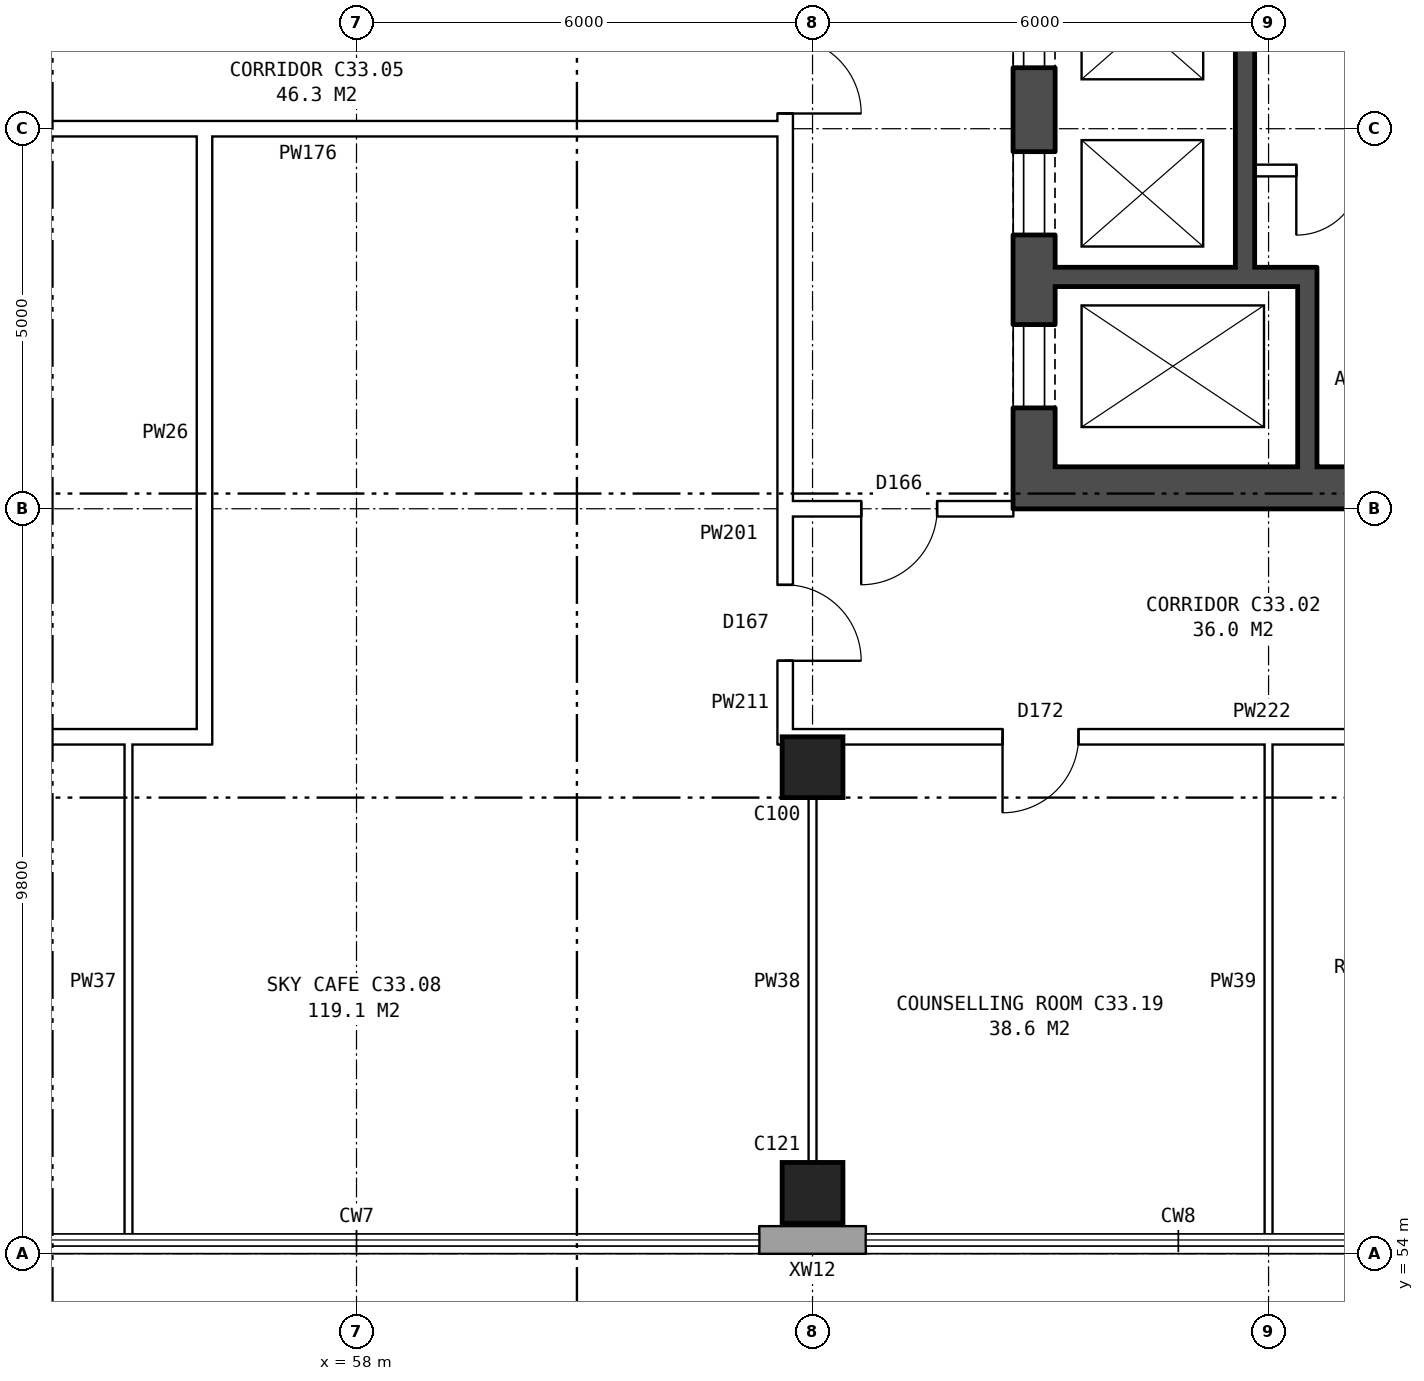
"""IFC4 building model, lengths in metres.
Left out: names, types, materials, properties, quantities, classifications, styles, units other than length and angle.
Written with IfcOpenShell. Run it as: python <this file> out.ifc"""

import sys

from ifc_helpers import new_model, si_unit, direction, frame, frame_2d, origin, origin_2d, place, context, subcontext, project, spatial, rectangle, extrude, element, fill, save


model = new_model("IFC4")
c1 = context("Model", 3, precision=1e-05, world=origin(), true_north=direction((0.0, 1.0)))
c2 = subcontext(c1, "Body", "Model", "MODEL_VIEW")
j1 = project(units=[si_unit("LENGTHUNIT", "METRE"), si_unit("PLANEANGLEUNIT", "RADIAN")], contexts=[c1])
p1 = place(None, origin())
s1 = spatial("IfcSite", under=j1, at=p1, CompositionType="ELEMENT")
p2 = place(p1, origin())
s2 = spatial("IfcBuilding", under=s1, at=p2, CompositionType="ELEMENT")
p3 = place(p2, frame((0.0, 0.0, 119.5)))
s3 = spatial("IfcBuildingStorey", under=s2, at=p3, CompositionType="ELEMENT", Elevation=119.5)
for number, where, z_axis, x_axis in (
    (1, (64.0, 54.8, 0.0), (0.0, 0.0, 1.0), (1.0, 0.0, 0.0)),
    (2, (64.0, 60.4, 0.0), (0.0, 0.0, 1.0), (1.0, 0.0, 0.0)),
):
    element("IfcColumn", number, at=place(p3, frame(where, z_axis=z_axis, x_axis=x_axis)), inside=s3, PredefinedType="COLUMN", context=c2, shape_type="SweptSolid", body=[
        extrude(rectangle(XDim=0.8, YDim=0.8, at=origin_2d()), origin(), (0.0, 0.0, 1.0), 3.6),
    ])
p4 = place(p3, frame((63.3, 54.18, 0.0), z_axis=(0.0, 0.0, 1.0), x_axis=(1.0, 0.0, 0.0)))
e3 = element("IfcWall", 3, at=p4, inside=s3, PredefinedType="STANDARD", context=c2, shape_type="SweptSolid", body=[
    extrude(rectangle(XDim=1.4, YDim=0.36, at=frame_2d((0.7, 0.0))), origin(), (0.0, 0.0, 1.0), 3.6),
])
p5 = place(p3, frame((66.915, 63.8, 0.0), z_axis=(0.0, 0.0, 1.0), x_axis=(0.0, 1.0, 0.0)))
e4 = element("IfcWall", 4, at=p5, inside=s3, PredefinedType="SHEAR", context=c2, shape_type="SweptSolid", body=[
    extrude(rectangle(XDim=12.4, YDim=0.55, at=frame_2d((6.2, 0.0))), origin(), (0.0, 0.0, 1.0), 3.6),
])
p6 = place(p5, frame((1.325, 0.0, 0.0)))
e5 = element("IfcOpeningElement", 5, at=p6, cuts=e4, PredefinedType="OPENING", context=c2, shape_type="SweptSolid", body=[
    extrude(rectangle(XDim=1.1, YDim=2.1, at=frame_2d((0.55, 1.05))), frame((0.0, 0.285, 0.0), z_axis=(0.0, -1.0, 0.0), x_axis=(1.0, 0.0, 0.0)), (0.0, 0.0, 1.0), 0.57),
])
p7 = place(p5, frame((3.6, 0.0, 0.0)))
e6 = element("IfcOpeningElement", 6, at=p7, cuts=e4, PredefinedType="OPENING", context=c2, shape_type="SweptSolid", body=[
    extrude(rectangle(XDim=1.1, YDim=2.1, at=frame_2d((0.55, 1.05))), frame((0.0, 0.285, 0.0), z_axis=(0.0, -1.0, 0.0), x_axis=(1.0, 0.0, 0.0)), (0.0, 0.0, 1.0), 0.57),
])
p8 = place(p5, frame((5.8, 0.0, 0.0)))
e7 = element("IfcOpeningElement", 7, at=p8, cuts=e4, PredefinedType="OPENING", context=c2, shape_type="SweptSolid", body=[
    extrude(rectangle(XDim=1.1, YDim=2.1, at=frame_2d((0.55, 1.05))), frame((0.0, 0.285, 0.0), z_axis=(0.0, -1.0, 0.0), x_axis=(1.0, 0.0, 0.0)), (0.0, 0.0, 1.0), 0.57),
])
p9 = place(p5, frame((8.0, 0.0, 0.0)))
e8 = element("IfcOpeningElement", 8, at=p9, cuts=e4, PredefinedType="OPENING", context=c2, shape_type="SweptSolid", body=[
    extrude(rectangle(XDim=1.1, YDim=2.1, at=frame_2d((0.55, 1.05))), frame((0.0, 0.285, 0.0), z_axis=(0.0, -1.0, 0.0), x_axis=(1.0, 0.0, 0.0)), (0.0, 0.0, 1.0), 0.57),
])
p10 = place(p5, frame((9.9, 0.0, 0.0)))
e9 = element("IfcOpeningElement", 9, at=p10, cuts=e4, PredefinedType="OPENING", context=c2, shape_type="SweptSolid", body=[
    extrude(rectangle(XDim=1.1, YDim=2.1, at=frame_2d((0.55, 1.05))), frame((0.0, 0.285, 0.0), z_axis=(0.0, -1.0, 0.0), x_axis=(1.0, 0.0, 0.0)), (0.0, 0.0, 1.0), 0.57),
])
p11 = place(p3, frame((67.19, 64.075, 0.0), z_axis=(0.0, 0.0, 1.0), x_axis=(1.0, 0.0, 0.0)))
e10 = element("IfcWall", 10, at=p11, inside=s3, PredefinedType="SHEAR", context=c2, shape_type="SweptSolid", body=[
    extrude(rectangle(XDim=7.9, YDim=0.55, at=frame_2d((3.95, 0.0))), origin(), (0.0, 0.0, 1.0), 3.6),
])
p12 = place(p3, frame((67.19, 66.85, 0.0), z_axis=(0.0, 0.0, 1.0), x_axis=(1.0, 0.0, 0.0)))
e11 = element("IfcWall", 11, at=p12, inside=s3, PredefinedType="SHEAR", context=c2, shape_type="SweptSolid", body=[
    extrude(rectangle(XDim=3.445, YDim=0.25, at=frame_2d((1.723, 0.0))), origin(), (0.0, 0.0, 1.0), 3.6),
])
p13 = place(p3, frame((69.815, 68.25, 0.0), z_axis=(0.0, 0.0, 1.0), x_axis=(1.0, 0.0, 0.0)))
e12 = element("IfcWall", 12, at=p13, inside=s3, PredefinedType="PARTITIONING", context=c2, shape_type="SweptSolid", body=[
    extrude(rectangle(XDim=1.95, YDim=0.15, at=frame_2d((0.975, 0.0))), origin(), (0.0, 0.0, 1.0), 3.6),
])
p14 = place(p13, frame((0.55, 0.0, 0.0)))
e13 = element("IfcOpeningElement", 13, at=p14, cuts=e12, PredefinedType="OPENING", context=c2, shape_type="SweptSolid", body=[
    extrude(rectangle(XDim=0.85, YDim=2.1, at=frame_2d((0.425, 1.05))), frame((0.0, 0.085, 0.0), z_axis=(0.0, -1.0, 0.0), x_axis=(1.0, 0.0, 0.0)), (0.0, 0.0, 1.0), 0.17),
])
p15 = place(p3, frame((69.69, 66.975, 0.0), z_axis=(0.0, 0.0, 1.0), x_axis=(0.0, 1.0, 0.0)))
e14 = element("IfcWall", 14, at=p15, inside=s3, PredefinedType="SHEAR", context=c2, shape_type="SweptSolid", body=[
    extrude(rectangle(XDim=6.6, YDim=0.25, at=frame_2d((3.3, 0.0))), origin(), (0.0, 0.0, 1.0), 3.6),
])
p16 = place(p3, frame((70.51, 64.35, 0.0), z_axis=(0.0, 0.0, 1.0), x_axis=(0.0, 1.0, 0.0)))
e15 = element("IfcWall", 15, at=p16, inside=s3, PredefinedType="SHEAR", context=c2, shape_type="SweptSolid", body=[
    extrude(rectangle(XDim=2.375, YDim=0.25, at=frame_2d((1.188, 0.0))), origin(), (0.0, 0.0, 1.0), 3.6),
])
p17 = place(p3, frame((63.64, 63.9, 0.0), z_axis=(0.0, 0.0, 1.0), x_axis=(0.0, 1.0, 0.0)))
e16 = element("IfcWall", 16, at=p17, inside=s3, PredefinedType="PARTITIONING", context=c2, shape_type="SweptSolid", body=[
    extrude(rectangle(XDim=12.2, YDim=0.2, at=frame_2d((6.1, 0.0))), origin(), (0.0, 0.0, 1.0), 3.6),
])
p18 = place(p17, frame((5.1, 0.0, 0.0)))
e17 = element("IfcOpeningElement", 17, at=p18, cuts=e16, PredefinedType="OPENING", context=c2, shape_type="SweptSolid", body=[
    extrude(rectangle(XDim=2.0, YDim=2.1, at=frame_2d((1.0, 1.05))), frame((0.0, 0.11, 0.0), z_axis=(0.0, -1.0, 0.0), x_axis=(1.0, 0.0, 0.0)), (0.0, 0.0, 1.0), 0.22),
])
p19 = place(p3, frame((26.99, 60.8, 0.0), z_axis=(0.0, 0.0, 1.0), x_axis=(1.0, 0.0, 0.0)))
e18 = element("IfcWall", 18, at=p19, inside=s3, PredefinedType="PARTITIONING", context=c2, shape_type="SweptSolid", body=[
    extrude(rectangle(XDim=29.11, YDim=0.2, at=frame_2d((14.555, 0.0))), origin(), (0.0, 0.0, 1.0), 3.6),
])
p20 = place(p19, frame((3.065, 0.0, 0.0)))
e19 = element("IfcOpeningElement", 19, at=p20, cuts=e18, PredefinedType="OPENING", context=c2, shape_type="SweptSolid", body=[
    extrude(rectangle(XDim=1.0, YDim=2.1, at=frame_2d((0.5, 1.05))), frame((0.0, 0.11, 0.0), z_axis=(0.0, -1.0, 0.0), x_axis=(1.0, 0.0, 0.0)), (0.0, 0.0, 1.0), 0.22),
])
p21 = place(p19, frame((9.51, 0.0, 0.0)))
e20 = element("IfcOpeningElement", 20, at=p21, cuts=e18, PredefinedType="OPENING", context=c2, shape_type="SweptSolid", body=[
    extrude(rectangle(XDim=1.0, YDim=2.1, at=frame_2d((0.5, 1.05))), frame((0.0, 0.11, 0.0), z_axis=(0.0, -1.0, 0.0), x_axis=(1.0, 0.0, 0.0)), (0.0, 0.0, 1.0), 0.22),
])
p22 = place(p19, frame((14.01, 0.0, 0.0)))
e21 = element("IfcOpeningElement", 21, at=p22, cuts=e18, PredefinedType="OPENING", context=c2, shape_type="SweptSolid", body=[
    extrude(rectangle(XDim=1.0, YDim=2.1, at=frame_2d((0.5, 1.05))), frame((0.0, 0.11, 0.0), z_axis=(0.0, -1.0, 0.0), x_axis=(1.0, 0.0, 0.0)), (0.0, 0.0, 1.0), 0.22),
])
p23 = place(p19, frame((22.191, 0.0, 0.0)))
e22 = element("IfcOpeningElement", 22, at=p23, cuts=e18, PredefinedType="OPENING", context=c2, shape_type="SweptSolid", body=[
    extrude(rectangle(XDim=1.0, YDim=2.1, at=frame_2d((0.5, 1.05))), frame((0.0, 0.11, 0.0), z_axis=(0.0, -1.0, 0.0), x_axis=(1.0, 0.0, 0.0)), (0.0, 0.0, 1.0), 0.22),
])
p24 = place(p3, frame((63.54, 60.8, 0.0), z_axis=(0.0, 0.0, 1.0), x_axis=(1.0, 0.0, 0.0)))
e23 = element("IfcWall", 23, at=p24, inside=s3, PredefinedType="PARTITIONING", context=c2, shape_type="SweptSolid", body=[
    extrude(rectangle(XDim=12.22, YDim=0.2, at=frame_2d((6.11, 0.0))), origin(), (0.0, 0.0, 1.0), 3.6),
])
p25 = place(p24, frame((2.96, 0.0, 0.0)))
e24 = element("IfcOpeningElement", 24, at=p25, cuts=e23, PredefinedType="OPENING", context=c2, shape_type="SweptSolid", body=[
    extrude(rectangle(XDim=1.0, YDim=2.1, at=frame_2d((0.5, 1.05))), frame((0.0, 0.11, 0.0), z_axis=(0.0, -1.0, 0.0), x_axis=(1.0, 0.0, 0.0)), (0.0, 0.0, 1.0), 0.22),
])
p26 = place(p24, frame((8.78, 0.0, 0.0)))
e25 = element("IfcOpeningElement", 25, at=p26, cuts=e23, PredefinedType="OPENING", context=c2, shape_type="SweptSolid", body=[
    extrude(rectangle(XDim=1.0, YDim=2.1, at=frame_2d((0.5, 1.05))), frame((0.0, 0.11, 0.0), z_axis=(0.0, -1.0, 0.0), x_axis=(1.0, 0.0, 0.0)), (0.0, 0.0, 1.0), 0.22),
])
p27 = place(p3, frame((63.54, 63.8, 0.0), z_axis=(0.0, 0.0, 1.0), x_axis=(1.0, 0.0, 0.0)))
e26 = element("IfcWall", 26, at=p27, inside=s3, PredefinedType="PARTITIONING", context=c2, shape_type="SweptSolid", body=[
    extrude(rectangle(XDim=3.1, YDim=0.2, at=frame_2d((1.55, 0.0))), origin(), (0.0, 0.0, 1.0), 3.6),
])
p28 = place(p27, frame((1.1, 0.0, 0.0)))
e27 = element("IfcOpeningElement", 27, at=p28, cuts=e26, PredefinedType="OPENING", context=c2, shape_type="SweptSolid", body=[
    extrude(rectangle(XDim=1.0, YDim=2.1, at=frame_2d((0.5, 1.05))), frame((0.0, 0.11, 0.0), z_axis=(0.0, -1.0, 0.0), x_axis=(1.0, 0.0, 0.0)), (0.0, 0.0, 1.0), 0.22),
])
p29 = place(p3, frame((44.36, 68.8, 0.0), z_axis=(0.0, 0.0, 1.0), x_axis=(1.0, 0.0, 0.0)))
e28 = element("IfcWall", 28, at=p29, inside=s3, PredefinedType="PARTITIONING", context=c2, shape_type="SweptSolid", body=[
    extrude(rectangle(XDim=19.28, YDim=0.2, at=frame_2d((9.64, 0.0))), origin(), (0.0, 0.0, 1.0), 3.6),
])
p30 = place(p29, frame((4.92, 0.0, 0.0)))
e29 = element("IfcOpeningElement", 29, at=p30, cuts=e28, PredefinedType="OPENING", context=c2, shape_type="SweptSolid", body=[
    extrude(rectangle(XDim=1.8, YDim=2.1, at=frame_2d((0.9, 1.05))), frame((0.0, 0.11, 0.0), z_axis=(0.0, -1.0, 0.0), x_axis=(1.0, 0.0, 0.0)), (0.0, 0.0, 1.0), 0.22),
])
p31 = place(p3, frame((55.0, 54.24, 0.0), z_axis=(0.0, 0.0, 1.0), x_axis=(0.0, 1.0, 0.0)))
e30 = element("IfcWall", 30, at=p31, inside=s3, PredefinedType="PARTITIONING", context=c2, shape_type="SweptSolid", body=[
    extrude(rectangle(XDim=6.66, YDim=0.1, at=frame_2d((3.33, 0.0))), origin(), (0.0, 0.0, 1.0), 3.6),
])
p32 = place(p3, frame((56.0, 60.7, 0.0), z_axis=(0.0, 0.0, 1.0), x_axis=(0.0, 1.0, 0.0)))
e31 = element("IfcWall", 31, at=p32, inside=s3, PredefinedType="PARTITIONING", context=c2, shape_type="SweptSolid", body=[
    extrude(rectangle(XDim=8.2, YDim=0.2, at=frame_2d((4.1, 0.0))), origin(), (0.0, 0.0, 1.0), 3.6),
])
p33 = place(p3, frame((63.64, 60.7, 0.0), z_axis=(0.0, 0.0, 1.0), x_axis=(0.0, 1.0, 0.0)))
e32 = element("IfcWall", 32, at=p33, inside=s3, PredefinedType="PARTITIONING", context=c2, shape_type="SweptSolid", body=[
    extrude(rectangle(XDim=3.2, YDim=0.2, at=frame_2d((1.6, 0.0))), origin(), (0.0, 0.0, 1.0), 3.6),
])
p34 = place(p33, frame((1.1, 0.0, 0.0)))
e33 = element("IfcOpeningElement", 33, at=p34, cuts=e32, PredefinedType="OPENING", context=c2, shape_type="SweptSolid", body=[
    extrude(rectangle(XDim=1.0, YDim=2.1, at=frame_2d((0.5, 1.05))), frame((0.0, 0.11, 0.0), z_axis=(0.0, -1.0, 0.0), x_axis=(1.0, 0.0, 0.0)), (0.0, 0.0, 1.0), 0.22),
])
for number, where, z_axis, x_axis in (
    (34, (64.0, 54.24, 0.0), (0.0, 0.0, 1.0), (0.0, 1.0, 0.0)),
    (35, (70.0, 54.24, 0.0), (0.0, 0.0, 1.0), (0.0, 1.0, 0.0)),
):
    element("IfcWall", number, at=place(p3, frame(where, z_axis=z_axis, x_axis=x_axis)), inside=s3, PredefinedType="PARTITIONING", context=c2, shape_type="SweptSolid", body=[
        extrude(rectangle(XDim=6.66, YDim=0.1, at=frame_2d((3.33, 0.0))), origin(), (0.0, 0.0, 1.0), 3.6),
    ])
p35 = place(p6, origin())
e36 = element("IfcDoor", 36, at=p35, inside=s3, OperationType="DOUBLE_DOOR_SLIDING", PredefinedType="DOOR", context=c2, shape_type="SweptSolid", body=[
    extrude(rectangle(XDim=1.1, YDim=2.1, at=frame_2d((0.55, 1.05))), frame((0.0, -0.21, 0.0), z_axis=(0.0, -1.0, 0.0), x_axis=(1.0, 0.0, 0.0)), (0.0, 0.0, 1.0), 0.05),
])
fill(e5, e36)
p36 = place(p7, origin())
e37 = element("IfcDoor", 37, at=p36, inside=s3, OperationType="DOUBLE_DOOR_SLIDING", PredefinedType="DOOR", context=c2, shape_type="SweptSolid", body=[
    extrude(rectangle(XDim=1.1, YDim=2.1, at=frame_2d((0.55, 1.05))), frame((0.0, -0.21, 0.0), z_axis=(0.0, -1.0, 0.0), x_axis=(1.0, 0.0, 0.0)), (0.0, 0.0, 1.0), 0.05),
])
fill(e6, e37)
p37 = place(p8, origin())
e38 = element("IfcDoor", 38, at=p37, inside=s3, OperationType="DOUBLE_DOOR_SLIDING", PredefinedType="DOOR", context=c2, shape_type="SweptSolid", body=[
    extrude(rectangle(XDim=1.1, YDim=2.1, at=frame_2d((0.55, 1.05))), frame((0.0, -0.21, 0.0), z_axis=(0.0, -1.0, 0.0), x_axis=(1.0, 0.0, 0.0)), (0.0, 0.0, 1.0), 0.05),
])
fill(e7, e38)
p38 = place(p14, frame((0.85, 0.0, 0.0), z_axis=(0.0, 0.0, 1.0), x_axis=(-1.0, 0.0, 0.0)))
e39 = element("IfcDoor", 39, at=p38, inside=s3, OperationType="SINGLE_SWING_RIGHT", PredefinedType="DOOR", context=c2, shape_type="SweptSolid", body=[
    extrude(rectangle(XDim=0.85, YDim=2.1, at=frame_2d((0.425, 1.05))), frame((0.0, 0.025, 0.0), z_axis=(0.0, -1.0, 0.0), x_axis=(1.0, 0.0, 0.0)), (0.0, 0.0, 1.0), 0.05),
])
fill(e13, e39)
p39 = place(p18, frame((2.0, 0.0, 0.0), z_axis=(0.0, 0.0, 1.0), x_axis=(-1.0, 0.0, 0.0)))
e40 = element("IfcDoor", 40, at=p39, inside=s3, OperationType="DOUBLE_DOOR_SINGLE_SWING", PredefinedType="DOOR", context=c2, shape_type="SweptSolid", body=[
    extrude(rectangle(XDim=2.0, YDim=2.1, at=frame_2d((1.0, 1.05))), frame((0.0, 0.025, 0.0), z_axis=(0.0, -1.0, 0.0), x_axis=(1.0, 0.0, 0.0)), (0.0, 0.0, 1.0), 0.05),
])
fill(e17, e40)
p40 = place(p25, frame((1.0, 0.0, 0.0), z_axis=(0.0, 0.0, 1.0), x_axis=(-1.0, 0.0, 0.0)))
e41 = element("IfcDoor", 41, at=p40, inside=s3, OperationType="SINGLE_SWING_RIGHT", PredefinedType="DOOR", context=c2, shape_type="SweptSolid", body=[
    extrude(rectangle(XDim=1.0, YDim=2.1, at=frame_2d((0.5, 1.05))), frame((0.0, 0.025, 0.0), z_axis=(0.0, -1.0, 0.0), x_axis=(1.0, 0.0, 0.0)), (0.0, 0.0, 1.0), 0.05),
])
fill(e24, e41)
p41 = place(p28, frame((1.0, 0.0, 0.0), z_axis=(0.0, 0.0, 1.0), x_axis=(-1.0, 0.0, 0.0)))
e42 = element("IfcDoor", 42, at=p41, inside=s3, OperationType="SINGLE_SWING_RIGHT", PredefinedType="DOOR", context=c2, shape_type="SweptSolid", body=[
    extrude(rectangle(XDim=1.0, YDim=2.1, at=frame_2d((0.5, 1.05))), frame((0.0, 0.025, 0.0), z_axis=(0.0, -1.0, 0.0), x_axis=(1.0, 0.0, 0.0)), (0.0, 0.0, 1.0), 0.05),
])
fill(e27, e42)
p42 = place(p34, frame((1.0, 0.0, 0.0), z_axis=(0.0, 0.0, 1.0), x_axis=(-1.0, 0.0, 0.0)))
e43 = element("IfcDoor", 43, at=p42, inside=s3, OperationType="SINGLE_SWING_RIGHT", PredefinedType="DOOR", context=c2, shape_type="SweptSolid", body=[
    extrude(rectangle(XDim=1.0, YDim=2.1, at=frame_2d((0.5, 1.05))), frame((0.0, 0.025, 0.0), z_axis=(0.0, -1.0, 0.0), x_axis=(1.0, 0.0, 0.0)), (0.0, 0.0, 1.0), 0.05),
])
fill(e33, e43)
save(model, sys.argv[1])
